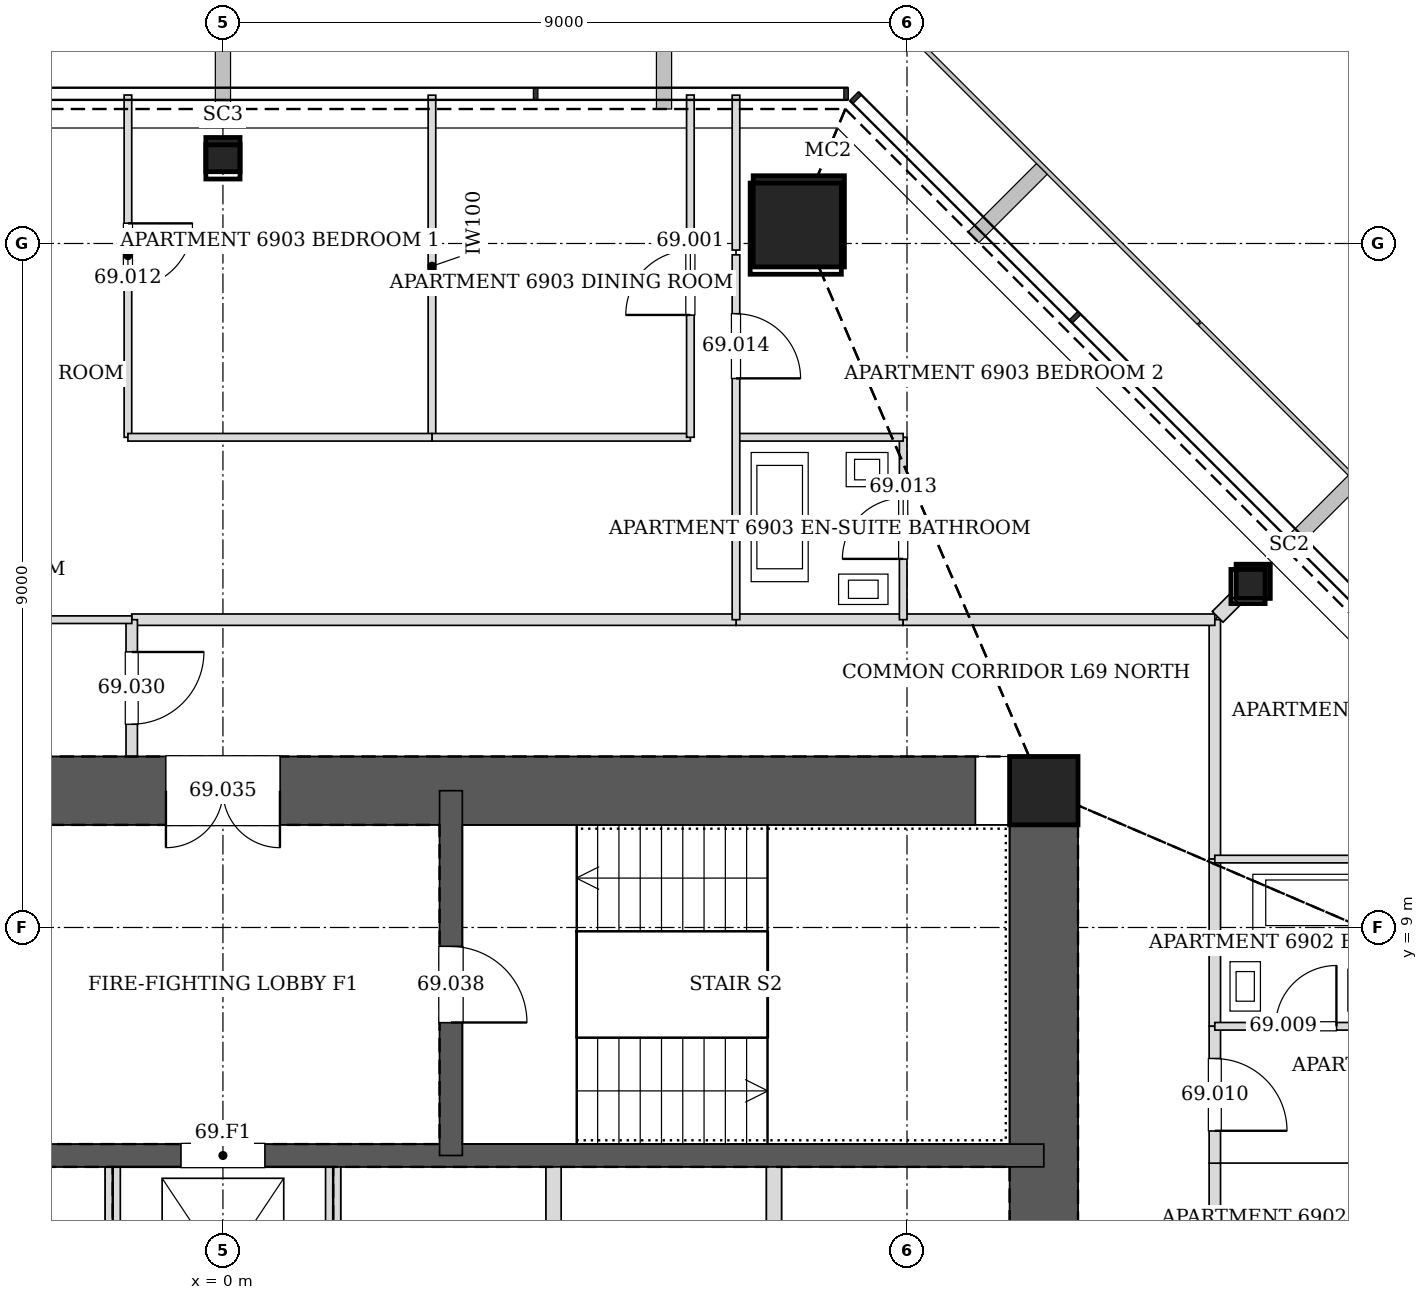
"""IFC4 building model, lengths in metres.
Left out: names, types, materials, properties, quantities, classifications, styles, units other than length and angle.
Written with IfcOpenShell. Run it as: python <this file> out.ifc"""

import sys

from ifc_helpers import new_model, si_unit, direction, frame, frame_2d, origin, origin_2d, place, context, subcontext, project, spatial, rectangle, hollow_rectangle, extrude, element, fill, save


model = new_model("IFC4")
c1 = context("Model", 3, precision=1e-05, world=origin(), true_north=direction((0.0, 1.0)))
c2 = subcontext(c1, "Body", "Model", "MODEL_VIEW")
j1 = project(units=[si_unit("LENGTHUNIT", "METRE"), si_unit("PLANEANGLEUNIT", "RADIAN")], contexts=[c1])
p1 = place(None, origin())
s1 = spatial("IfcSite", under=j1, at=p1, CompositionType="ELEMENT")
p2 = place(p1, origin())
s2 = spatial("IfcBuilding", under=s1, at=p2, CompositionType="ELEMENT")
p3 = place(p2, frame((0.0, 0.0, 284.4)))
s3 = spatial("IfcBuildingStorey", under=s2, at=p3, CompositionType="ELEMENT", Elevation=284.4)
p4 = place(p3, frame((7.576, 18.291, 0.0), z_axis=(-0.011698403216, -0.028277121884, 0.999531666202), x_axis=(0.924045401938, -0.382282742426, 0.0)))
e1 = element("IfcColumn", 1, at=p4, inside=s3, PredefinedType="COLUMN", context=c2, shape_type="SweptSolid", body=[
    extrude(hollow_rectangle(XDim=1.2, YDim=1.2, WallThickness=0.055, at=origin_2d()), origin(), (0.0, 0.0, 1.0), 3.402),
])
for number, where, z_axis, x_axis in (
    (2, (13.555, 13.555, 0.0), (-0.02, -0.02, 1.0), (0.707, -0.707, 0.0)),
    (3, (0.0, 19.169, 0.0), (0.0, -0.028, 1.0), (1.0, 0.0, 0.0)),
):
    element("IfcColumn", number, at=place(p3, frame(where, z_axis=z_axis, x_axis=x_axis)), inside=s3, PredefinedType="COLUMN", context=c2, shape_type="SweptSolid", body=[
        extrude(hollow_rectangle(XDim=0.45, YDim=0.45, WallThickness=0.02, at=origin_2d()), origin(), (0.0, 0.0, 1.0), 3.402),
    ])
p5 = place(p3, frame((10.8, 10.8, 0.0), z_axis=(0.0, 0.0, 1.0), x_axis=(1.0, 0.0, 0.0)))
e4 = element("IfcColumn", 4, at=p5, inside=s3, PredefinedType="COLUMN", context=c2, shape_type="SweptSolid", body=[
    extrude(hollow_rectangle(XDim=0.9, YDim=0.9, WallThickness=0.04, at=origin_2d()), origin(), (0.0, 0.0, 1.0), 3.4),
])
p6 = place(p3, frame((10.8, -10.8, 0.0), z_axis=(0.0, 0.0, 1.0), x_axis=(0.0, 1.0, 0.0)))
e5 = element("IfcWall", 5, at=p6, inside=s3, PredefinedType="SOLIDWALL", context=c2, shape_type="SweptSolid", body=[
    extrude(rectangle(XDim=21.6, YDim=0.9, at=frame_2d((10.8, 0.0))), origin(), (0.0, 0.0, 1.0), 3.4),
])
p7 = place(p6, frame((11.7, 0.0, 0.0)))
e6 = element("IfcOpeningElement", 6, at=p7, cuts=e5, PredefinedType="OPENING", context=c2, shape_type="SweptSolid", body=[
    extrude(rectangle(XDim=1.2, YDim=2.1, at=frame_2d((0.6, 1.05))), frame((0.0, 0.46, 0.0), z_axis=(0.0, -1.0, 0.0), x_axis=(1.0, 0.0, 0.0)), (0.0, 0.0, 1.0), 0.92),
])
p8 = place(p6, frame((8.7, 0.0, 0.0)))
e7 = element("IfcOpeningElement", 7, at=p8, cuts=e5, PredefinedType="OPENING", context=c2, shape_type="SweptSolid", body=[
    extrude(rectangle(XDim=1.2, YDim=2.1, at=frame_2d((0.6, 1.05))), frame((0.0, 0.46, 0.0), z_axis=(0.0, -1.0, 0.0), x_axis=(1.0, 0.0, 0.0)), (0.0, 0.0, 1.0), 0.92),
])
p9 = place(p3, frame((10.8, 10.8, 0.0), z_axis=(0.0, 0.0, 1.0), x_axis=(-1.0, 0.0, 0.0)))
e8 = element("IfcWall", 8, at=p9, inside=s3, PredefinedType="SOLIDWALL", context=c2, shape_type="SweptSolid", body=[
    extrude(rectangle(XDim=21.6, YDim=0.9, at=frame_2d((10.8, 0.0))), origin(), (0.0, 0.0, 1.0), 3.4),
])
p10 = place(p9, frame((10.05, 0.0, 0.0)))
e9 = element("IfcOpeningElement", 9, at=p10, cuts=e8, PredefinedType="OPENING", context=c2, shape_type="SweptSolid", body=[
    extrude(rectangle(XDim=1.5, YDim=2.1, at=frame_2d((0.75, 1.05))), frame((0.0, 0.46, 0.0), z_axis=(0.0, -1.0, 0.0), x_axis=(1.0, 0.0, 0.0)), (0.0, 0.0, 1.0), 0.92),
])
p11 = place(p3, frame((-10.8, 6.0, 0.0), z_axis=(0.0, 0.0, 1.0), x_axis=(1.0, 0.0, 0.0)))
e10 = element("IfcWall", 10, at=p11, inside=s3, PredefinedType="SOLIDWALL", context=c2, shape_type="SweptSolid", body=[
    extrude(rectangle(XDim=21.6, YDim=0.3, at=frame_2d((10.8, 0.0))), origin(), (0.0, 0.0, 1.0), 3.4),
])
p12 = place(p11, frame((10.25, 0.0, 0.0)))
e11 = element("IfcOpeningElement", 11, at=p12, cuts=e10, PredefinedType="OPENING", context=c2, shape_type="SweptSolid", body=[
    extrude(rectangle(XDim=1.1, YDim=2.1, at=frame_2d((0.55, 1.05))), frame((0.0, 0.16, 0.0), z_axis=(0.0, -1.0, 0.0), x_axis=(1.0, 0.0, 0.0)), (0.0, 0.0, 1.0), 0.32),
])
p13 = place(p3, frame((3.0, 6.0, 0.0), z_axis=(0.0, 0.0, 1.0), x_axis=(0.0, 1.0, 0.0)))
e12 = element("IfcWall", 12, at=p13, inside=s3, PredefinedType="SOLIDWALL", context=c2, shape_type="SweptSolid", body=[
    extrude(rectangle(XDim=4.8, YDim=0.3, at=frame_2d((2.4, 0.0))), origin(), (0.0, 0.0, 1.0), 3.4),
])
p14 = place(p13, frame((1.75, 0.0, 0.0)))
e13 = element("IfcOpeningElement", 13, at=p14, cuts=e12, PredefinedType="OPENING", context=c2, shape_type="SweptSolid", body=[
    extrude(rectangle(XDim=1.0, YDim=2.1, at=frame_2d((0.5, 1.05))), frame((0.0, 0.16, 0.0), z_axis=(0.0, -1.0, 0.0), x_axis=(1.0, 0.0, 0.0)), (0.0, 0.0, 1.0), 0.32),
])
p15 = place(p3, frame((13.05, 9.899, 0.0), z_axis=(0.0, 0.0, 1.0), x_axis=(0.0, 1.0, 0.0)))
e14 = element("IfcWall", 14, at=p15, inside=s3, PredefinedType="PARTITIONING", context=c2, shape_type="SweptSolid", body=[
    extrude(rectangle(XDim=3.151, YDim=0.15, at=frame_2d((1.576, 0.0))), origin(), (0.0, 0.0, 1.0), 2.497),
])
p16 = place(p3, frame((13.05, 7.699, 0.0), z_axis=(0.0, 0.0, 1.0), x_axis=(0.0, 1.0, 0.0)))
e15 = element("IfcWall", 15, at=p16, inside=s3, PredefinedType="PARTITIONING", context=c2, shape_type="SweptSolid", body=[
    extrude(rectangle(XDim=2.202, YDim=0.15, at=frame_2d((1.101, 0.0))), origin(), (0.0, 0.0, 1.0), 2.497),
])
p17 = place(p3, frame((13.05, 4.449, 0.0), z_axis=(0.0, 0.0, 1.0), x_axis=(0.0, 1.0, 0.0)))
e16 = element("IfcWall", 16, at=p17, inside=s3, PredefinedType="PARTITIONING", context=c2, shape_type="SweptSolid", body=[
    extrude(rectangle(XDim=1.452, YDim=0.15, at=frame_2d((0.726, 0.0))), origin(), (0.0, 0.0, 1.0), 3.2),
])
p18 = place(p3, frame((13.05, 5.899, 0.0), z_axis=(0.0, 0.0, 1.0), x_axis=(0.0, 1.0, 0.0)))
e17 = element("IfcWall", 17, at=p18, inside=s3, PredefinedType="PARTITIONING", context=c2, shape_type="SweptSolid", body=[
    extrude(rectangle(XDim=1.802, YDim=0.15, at=frame_2d((0.901, 0.0))), origin(), (0.0, 0.0, 1.0), 3.2),
])
p19 = place(p18, frame((0.426, 0.0, 0.0)))
e18 = element("IfcOpeningElement", 18, at=p19, cuts=e17, PredefinedType="OPENING", context=c2, shape_type="SweptSolid", body=[
    extrude(rectangle(XDim=0.95, YDim=2.1, at=frame_2d((0.475, 1.05))), frame((0.0, 0.085, 0.0), z_axis=(0.0, -1.0, 0.0), x_axis=(1.0, 0.0, 0.0)), (0.0, 0.0, 1.0), 0.17),
])
p20 = place(p3, frame((8.951, 13.05, 0.0), z_axis=(0.0, 0.0, 1.0), x_axis=(-1.0, 0.0, 0.0)))
e19 = element("IfcWall", 19, at=p20, inside=s3, PredefinedType="PARTITIONING", context=c2, shape_type="SweptSolid", body=[
    extrude(rectangle(XDim=2.202, YDim=0.15, at=frame_2d((1.101, 0.0))), origin(), (0.0, 0.0, 1.0), 3.2),
])
p21 = place(p3, frame((13.05, 13.05, 0.0), z_axis=(0.0, 0.0, 1.0), x_axis=(-1.0, 0.0, 0.0)))
e20 = element("IfcWall", 20, at=p21, inside=s3, PredefinedType="PARTITIONING", context=c2, shape_type="SweptSolid", body=[
    extrude(rectangle(XDim=4.101, YDim=0.15, at=frame_2d((2.051, 0.0))), origin(), (0.0, 0.0, 1.0), 2.497),
])
p22 = place(p3, frame((6.751, 13.05, 0.0), z_axis=(0.0, 0.0, 1.0), x_axis=(-1.0, 0.0, 0.0)))
e21 = element("IfcWall", 21, at=p22, inside=s3, PredefinedType="PARTITIONING", context=c2, shape_type="SweptSolid", body=[
    extrude(rectangle(XDim=7.951, YDim=0.15, at=frame_2d((3.976, 0.0))), origin(), (0.0, 0.0, 1.0), 2.349),
])
p23 = place(p3, frame((-1.2, 13.05, 0.0), z_axis=(0.0, 0.0, 1.0), x_axis=(0.0, -1.0, 0.0)))
e22 = element("IfcWall", 22, at=p23, inside=s3, PredefinedType="PARTITIONING", context=c2, shape_type="SweptSolid", body=[
    extrude(rectangle(XDim=1.8, YDim=0.15, at=frame_2d((0.9, 0.0))), origin(), (0.0, 0.0, 1.0), 3.2),
])
p24 = place(p23, frame((0.425, 0.0, 0.0)))
e23 = element("IfcOpeningElement", 23, at=p24, cuts=e22, PredefinedType="OPENING", context=c2, shape_type="SweptSolid", body=[
    extrude(rectangle(XDim=0.95, YDim=2.1, at=frame_2d((0.475, 1.05))), frame((0.0, 0.085, 0.0), z_axis=(0.0, -1.0, 0.0), x_axis=(1.0, 0.0, 0.0)), (0.0, 0.0, 1.0), 0.17),
])
p25 = place(p3, frame((2.75, 19.951, 0.0), z_axis=(0.0, 0.0, 1.0), x_axis=(0.0, -1.0, 0.0)))
e24 = element("IfcWall", 24, at=p25, inside=s3, PredefinedType="PARTITIONING", context=c2, shape_type="SweptSolid", body=[
    extrude(rectangle(XDim=4.501, YDim=0.1, at=frame_2d((2.251, 0.0))), origin(), (0.0, 0.0, 1.0), 2.591),
])
p26 = place(p3, frame((2.75, 15.45, 0.0), z_axis=(0.0, 0.0, 1.0), x_axis=(1.0, 0.0, 0.0)))
e25 = element("IfcWall", 25, at=p26, inside=s3, PredefinedType="PARTITIONING", context=c2, shape_type="SweptSolid", body=[
    extrude(rectangle(XDim=3.4, YDim=0.1, at=frame_2d((1.7, 0.0))), origin(), (0.0, 0.0, 1.0), 3.2),
])
p27 = place(p3, frame((6.15, 15.45, 0.0), z_axis=(0.0, 0.0, 1.0), x_axis=(0.0, 1.0, 0.0)))
e26 = element("IfcWall", 26, at=p27, inside=s3, PredefinedType="PARTITIONING", context=c2, shape_type="SweptSolid", body=[
    extrude(rectangle(XDim=4.503, YDim=0.1, at=frame_2d((2.252, 0.0))), origin(), (0.0, 0.0, 1.0), 2.591),
])
p28 = place(p27, frame((1.61, 0.0, 0.0)))
e27 = element("IfcOpeningElement", 27, at=p28, cuts=e26, PredefinedType="OPENING", context=c2, shape_type="SweptSolid", body=[
    extrude(rectangle(XDim=0.85, YDim=2.1, at=frame_2d((0.425, 1.05))), frame((0.0, 0.06, 0.0), z_axis=(0.0, -1.0, 0.0), x_axis=(1.0, 0.0, 0.0)), (0.0, 0.0, 1.0), 0.12),
])
p29 = place(p3, frame((13.05, 9.9, 0.0), z_axis=(0.0, 0.0, 1.0), x_axis=(1.0, 0.0, 0.0)))
e28 = element("IfcWall", 28, at=p29, inside=s3, PredefinedType="PARTITIONING", context=c2, shape_type="SweptSolid", body=[
    extrude(rectangle(XDim=2.401, YDim=0.1, at=frame_2d((1.2, 0.0))), origin(), (0.0, 0.0, 1.0), 2.497),
])
p30 = place(p3, frame((13.314, 13.314, 0.0), z_axis=(0.0, 0.0, 1.0), x_axis=(-0.707106781187, -0.707106781187, 0.0)))
e29 = element("IfcWall", 29, at=p30, inside=s3, PredefinedType="PARTITIONING", context=c2, shape_type="SweptSolid", body=[
    extrude(rectangle(XDim=0.321, YDim=0.2, at=frame_2d((0.16, 0.0))), origin(), (0.0, 0.0, 1.0), 2.591),
])
p31 = place(p3, frame((13.05, 7.7, 0.0), z_axis=(0.0, 0.0, 1.0), x_axis=(1.0, 0.0, 0.0)))
e30 = element("IfcWall", 30, at=p31, inside=s3, PredefinedType="PARTITIONING", context=c2, shape_type="SweptSolid", body=[
    extrude(rectangle(XDim=2.4, YDim=0.1, at=frame_2d((1.2, 0.0))), origin(), (0.0, 0.0, 1.0), 2.591),
])
p32 = place(p31, frame((0.8, 0.0, 0.0)))
e31 = element("IfcOpeningElement", 31, at=p32, cuts=e30, PredefinedType="OPENING", context=c2, shape_type="SweptSolid", body=[
    extrude(rectangle(XDim=0.8, YDim=2.1, at=frame_2d((0.4, 1.05))), frame((0.0, 0.06, 0.0), z_axis=(0.0, -1.0, 0.0), x_axis=(1.0, 0.0, 0.0)), (0.0, 0.0, 1.0), 0.12),
])
p33 = place(p3, frame((-7.05, 13.05, 0.0), z_axis=(0.0, 0.0, 1.0), x_axis=(1.0, 0.0, 0.0)))
e32 = element("IfcWall", 32, at=p33, inside=s3, PredefinedType="PARTITIONING", context=c2, shape_type="SweptSolid", body=[
    extrude(rectangle(XDim=5.851, YDim=0.1, at=frame_2d((2.926, 0.0))), origin(), (0.0, 0.0, 1.0), 3.2),
])
p34 = place(p3, frame((-1.25, 19.953, 0.0), z_axis=(0.0, 0.0, 1.0), x_axis=(0.0, -1.0, 0.0)))
e33 = element("IfcWall", 33, at=p34, inside=s3, PredefinedType="PARTITIONING", context=c2, shape_type="SweptSolid", body=[
    extrude(rectangle(XDim=4.503, YDim=0.1, at=frame_2d((2.252, 0.0))), origin(), (0.0, 0.0, 1.0), 2.591),
])
p35 = place(p34, frame((1.689, 0.0, 0.0)))
e34 = element("IfcOpeningElement", 34, at=p35, cuts=e33, PredefinedType="OPENING", context=c2, shape_type="SweptSolid", body=[
    extrude(rectangle(XDim=0.85, YDim=2.1, at=frame_2d((0.425, 1.05))), frame((0.0, 0.06, 0.0), z_axis=(0.0, -1.0, 0.0), x_axis=(1.0, 0.0, 0.0)), (0.0, 0.0, 1.0), 0.12),
])
p36 = place(p3, frame((-1.25, 15.45, 0.0), z_axis=(0.0, 0.0, 1.0), x_axis=(1.0, 0.0, 0.0)))
e35 = element("IfcWall", 35, at=p36, inside=s3, PredefinedType="PARTITIONING", context=c2, shape_type="SweptSolid", body=[
    extrude(rectangle(XDim=4.0, YDim=0.1, at=frame_2d((2.0, 0.0))), origin(), (0.0, 0.0, 1.0), 2.349),
])
p37 = place(p3, frame((8.95, 13.05, 0.0), z_axis=(0.0, 0.0, 1.0), x_axis=(0.0, 1.0, 0.0)))
e36 = element("IfcWall", 36, at=p37, inside=s3, PredefinedType="PARTITIONING", context=c2, shape_type="SweptSolid", body=[
    extrude(rectangle(XDim=2.4, YDim=0.1, at=frame_2d((1.2, 0.0))), origin(), (0.0, 0.0, 1.0), 2.497),
])
p38 = place(p37, frame((0.8, 0.0, 0.0)))
e37 = element("IfcOpeningElement", 37, at=p38, cuts=e36, PredefinedType="OPENING", context=c2, shape_type="SweptSolid", body=[
    extrude(rectangle(XDim=0.8, YDim=2.1, at=frame_2d((0.4, 1.05))), frame((0.0, 0.06, 0.0), z_axis=(0.0, -1.0, 0.0), x_axis=(1.0, 0.0, 0.0)), (0.0, 0.0, 1.0), 0.12),
])
p39 = place(p3, frame((8.95, 15.45, 0.0), z_axis=(0.0, 0.0, 1.0), x_axis=(-1.0, 0.0, 0.0)))
e38 = element("IfcWall", 38, at=p39, inside=s3, PredefinedType="PARTITIONING", context=c2, shape_type="SweptSolid", body=[
    extrude(rectangle(XDim=2.2, YDim=0.1, at=frame_2d((1.1, 0.0))), origin(), (0.0, 0.0, 1.0), 2.497),
])
p40 = place(p3, frame((6.75, 13.05, 0.0), z_axis=(0.0, 0.0, 1.0), x_axis=(0.0, 1.0, 0.0)))
e39 = element("IfcWall", 39, at=p40, inside=s3, PredefinedType="PARTITIONING", context=c2, shape_type="SweptSolid", body=[
    extrude(rectangle(XDim=4.801, YDim=0.1, at=frame_2d((2.4, 0.0))), origin(), (0.0, 0.0, 1.0), 2.591),
])
p41 = place(p40, frame((3.175, 0.0, 0.0)))
e40 = element("IfcOpeningElement", 40, at=p41, cuts=e39, PredefinedType="OPENING", context=c2, shape_type="SweptSolid", body=[
    extrude(rectangle(XDim=0.85, YDim=2.1, at=frame_2d((0.425, 1.05))), frame((0.0, 0.06, 0.0), z_axis=(0.0, -1.0, 0.0), x_axis=(1.0, 0.0, 0.0)), (0.0, 0.0, 1.0), 0.12),
])
p42 = place(p3, frame((6.75, 19.951, 0.0), z_axis=(0.0, 0.0, 1.0), x_axis=(0.0, -1.0, 0.0)))
e41 = element("IfcWall", 41, at=p42, inside=s3, PredefinedType="PARTITIONING", context=c2, shape_type="SweptSolid", body=[
    extrude(rectangle(XDim=2.038, YDim=0.1, at=frame_2d((1.019, 0.0))), origin(), (0.0, 0.0, 1.0), 2.74),
])
for number, where, z_axis, x_axis in (
    (42, (-1.45, 3.15, 0.0), (0.0, 0.0, 1.0), (0.0, 1.0, 0.0)),
    (43, (1.45, 3.15, 0.0), (0.0, 0.0, 1.0), (0.0, 1.0, 0.0)),
    (44, (4.35, 3.15, 0.0), (0.0, 0.0, 1.0), (0.0, 1.0, 0.0)),
    (45, (7.25, 3.15, 0.0), (0.0, 0.0, 1.0), (0.0, 1.0, 0.0)),
):
    element("IfcWall", number, at=place(p3, frame(where, z_axis=z_axis, x_axis=x_axis)), inside=s3, PredefinedType="PARTITIONING", context=c2, shape_type="SweptSolid", body=[
        extrude(rectangle(XDim=2.7, YDim=0.2, at=frame_2d((1.35, 0.0))), origin(), (0.0, 0.0, 1.0), 3.2),
    ])
p43 = place(p28, origin())
e46 = element("IfcDoor", 46, at=p43, inside=s3, OperationType="SINGLE_SWING_LEFT", PredefinedType="DOOR", context=c2, shape_type="SweptSolid", body=[
    extrude(rectangle(XDim=0.85, YDim=2.1, at=frame_2d((0.425, 1.05))), frame((0.0, 0.025, 0.0), z_axis=(0.0, -1.0, 0.0), x_axis=(1.0, 0.0, 0.0)), (0.0, 0.0, 1.0), 0.05),
])
fill(e27, e46)
p44 = place(p32, origin())
e47 = element("IfcDoor", 47, at=p44, inside=s3, OperationType="SINGLE_SWING_RIGHT", PredefinedType="DOOR", context=c2, shape_type="SweptSolid", body=[
    extrude(rectangle(XDim=0.8, YDim=2.1, at=frame_2d((0.4, 1.05))), frame((0.0, 0.025, 0.0), z_axis=(0.0, -1.0, 0.0), x_axis=(1.0, 0.0, 0.0)), (0.0, 0.0, 1.0), 0.05),
])
fill(e31, e47)
p45 = place(p19, frame((0.95, 0.0, 0.0), z_axis=(0.0, 0.0, 1.0), x_axis=(-1.0, 0.0, 0.0)))
e48 = element("IfcDoor", 48, at=p45, inside=s3, OperationType="SINGLE_SWING_RIGHT", PredefinedType="DOOR", context=c2, shape_type="SweptSolid", body=[
    extrude(rectangle(XDim=0.95, YDim=2.1, at=frame_2d((0.475, 1.05))), frame((0.0, 0.025, 0.0), z_axis=(0.0, -1.0, 0.0), x_axis=(1.0, 0.0, 0.0)), (0.0, 0.0, 1.0), 0.05),
])
fill(e18, e48)
p46 = place(p35, origin())
e49 = element("IfcDoor", 49, at=p46, inside=s3, OperationType="SINGLE_SWING_LEFT", PredefinedType="DOOR", context=c2, shape_type="SweptSolid", body=[
    extrude(rectangle(XDim=0.85, YDim=2.1, at=frame_2d((0.425, 1.05))), frame((0.0, 0.025, 0.0), z_axis=(0.0, -1.0, 0.0), x_axis=(1.0, 0.0, 0.0)), (0.0, 0.0, 1.0), 0.05),
])
fill(e34, e49)
p47 = place(p38, origin())
e50 = element("IfcDoor", 50, at=p47, inside=s3, OperationType="SINGLE_SWING_LEFT", PredefinedType="DOOR", context=c2, shape_type="SweptSolid", body=[
    extrude(rectangle(XDim=0.8, YDim=2.1, at=frame_2d((0.4, 1.05))), frame((0.0, 0.025, 0.0), z_axis=(0.0, -1.0, 0.0), x_axis=(1.0, 0.0, 0.0)), (0.0, 0.0, 1.0), 0.05),
])
fill(e37, e50)
p48 = place(p41, frame((0.85, 0.0, 0.0), z_axis=(0.0, 0.0, 1.0), x_axis=(-1.0, 0.0, 0.0)))
e51 = element("IfcDoor", 51, at=p48, inside=s3, OperationType="SINGLE_SWING_RIGHT", PredefinedType="DOOR", context=c2, shape_type="SweptSolid", body=[
    extrude(rectangle(XDim=0.85, YDim=2.1, at=frame_2d((0.425, 1.05))), frame((0.0, 0.025, 0.0), z_axis=(0.0, -1.0, 0.0), x_axis=(1.0, 0.0, 0.0)), (0.0, 0.0, 1.0), 0.05),
])
fill(e40, e51)
p49 = place(p24, origin())
e52 = element("IfcDoor", 52, at=p49, inside=s3, OperationType="SINGLE_SWING_LEFT", PredefinedType="DOOR", context=c2, shape_type="SweptSolid", body=[
    extrude(rectangle(XDim=0.95, YDim=2.1, at=frame_2d((0.475, 1.05))), frame((0.0, 0.025, 0.0), z_axis=(0.0, -1.0, 0.0), x_axis=(1.0, 0.0, 0.0)), (0.0, 0.0, 1.0), 0.05),
])
fill(e23, e52)
p50 = place(p10, origin())
e53 = element("IfcDoor", 53, at=p50, inside=s3, OperationType="DOUBLE_DOOR_SINGLE_SWING", PredefinedType="DOOR", context=c2, shape_type="SweptSolid", body=[
    extrude(rectangle(XDim=1.5, YDim=2.1, at=frame_2d((0.75, 1.05))), frame((0.0, 0.025, 0.0), z_axis=(0.0, -1.0, 0.0), x_axis=(1.0, 0.0, 0.0)), (0.0, 0.0, 1.0), 0.05),
])
fill(e9, e53)
p51 = place(p14, frame((1.0, 0.0, 0.0), z_axis=(0.0, 0.0, 1.0), x_axis=(-1.0, 0.0, 0.0)))
e54 = element("IfcDoor", 54, at=p51, inside=s3, OperationType="SINGLE_SWING_RIGHT", PredefinedType="DOOR", context=c2, shape_type="SweptSolid", body=[
    extrude(rectangle(XDim=1.0, YDim=2.1, at=frame_2d((0.5, 1.05))), frame((0.0, 0.025, 0.0), z_axis=(0.0, -1.0, 0.0), x_axis=(1.0, 0.0, 0.0)), (0.0, 0.0, 1.0), 0.05),
])
fill(e13, e54)
p52 = place(p12, origin())
e55 = element("IfcDoor", 55, at=p52, inside=s3, OperationType="DOUBLE_DOOR_SLIDING", PredefinedType="DOOR", context=c2, shape_type="SweptSolid", body=[
    extrude(rectangle(XDim=1.1, YDim=2.1, at=frame_2d((0.55, 1.05))), frame((0.0, 0.025, 0.0), z_axis=(0.0, -1.0, 0.0), x_axis=(1.0, 0.0, 0.0)), (0.0, 0.0, 1.0), 0.05),
])
fill(e11, e55)
save(model, sys.argv[1])
